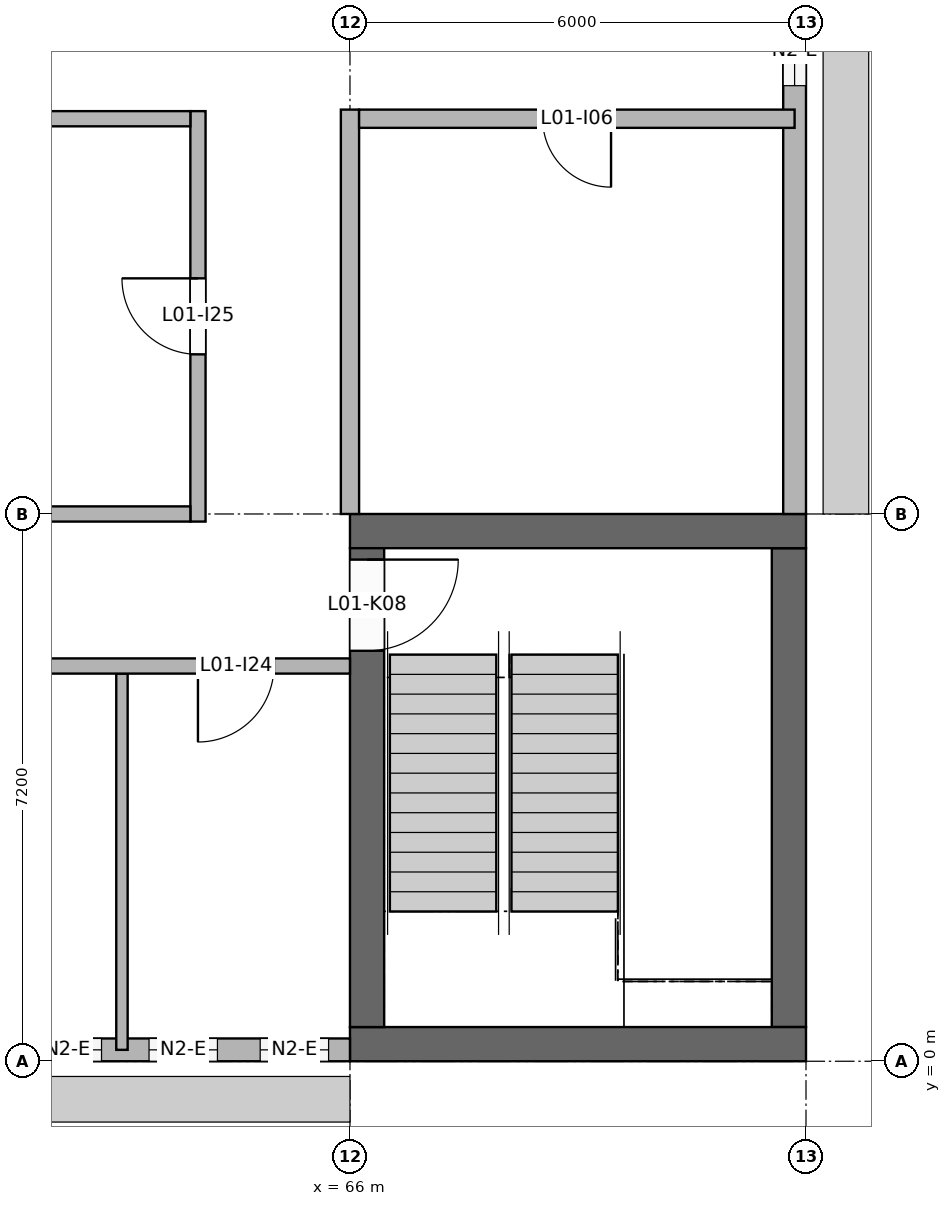
"""IFC4 building model, lengths in metres.
Left out: names, types, materials, properties, quantities, classifications, styles, units other than length and angle.
Written with IfcOpenShell. Run it as: python <this file> out.ifc"""

import sys

from ifc_helpers import new_model, si_unit, direction, frame, frame_2d, origin, place, context, subcontext, project, spatial, rectangle, extrude, element, fill, save


model = new_model("IFC4")
c1 = context("Model", 3, precision=1e-05, world=origin(), true_north=direction((0.0, 1.0)))
c2 = subcontext(c1, "Body", "Model", "MODEL_VIEW")
j1 = project(units=[si_unit("LENGTHUNIT", "METRE"), si_unit("PLANEANGLEUNIT", "RADIAN")], contexts=[c1])
p1 = place(None, origin())
s1 = spatial("IfcSite", under=j1, at=p1, CompositionType="ELEMENT")
p2 = place(p1, origin())
s2 = spatial("IfcBuilding", under=s1, at=p2, CompositionType="ELEMENT")
p3 = place(p2, frame((0.0, 0.0, 4.2)))
s3 = spatial("IfcBuildingStorey", under=s2, at=p3, CompositionType="ELEMENT", Elevation=4.2)
for number, where, z_axis, x_axis in (
    (1, (66.0, 0.225, 0.0), (0.0, 0.0, 1.0), (1.0, 0.0, 0.0)),
    (2, (66.0, 6.975, 0.0), (0.0, 0.0, 1.0), (1.0, 0.0, 0.0)),
):
    element("IfcWall", number, at=place(p3, frame(where, z_axis=z_axis, x_axis=x_axis)), inside=s3, PredefinedType="SHEAR", context=c2, shape_type="SweptSolid", body=[
        extrude(rectangle(XDim=6.0, YDim=0.45, at=frame_2d((3.0, 0.0))), origin(), (0.0, 0.0, 1.0), 3.95),
    ])
p4 = place(p3, frame((66.225, 0.45, 0.0), z_axis=(0.0, 0.0, 1.0), x_axis=(0.0, 1.0, 0.0)))
e3 = element("IfcWall", 3, at=p4, inside=s3, PredefinedType="SHEAR", context=c2, shape_type="SweptSolid", body=[
    extrude(rectangle(XDim=6.3, YDim=0.45, at=frame_2d((3.15, 0.0))), origin(), (0.0, 0.0, 1.0), 3.95),
])
p5 = place(p4, frame((4.95, 0.0, 0.0)))
e4 = element("IfcOpeningElement", 4, at=p5, cuts=e3, PredefinedType="OPENING", context=c2, shape_type="SweptSolid", body=[
    extrude(rectangle(XDim=1.2, YDim=2.1, at=frame_2d((0.6, 1.05))), frame((0.0, 0.235, 0.0), z_axis=(0.0, -1.0, 0.0), x_axis=(1.0, 0.0, 0.0)), (0.0, 0.0, 1.0), 0.47),
])
p6 = place(p3, frame((71.775, 0.45, 0.0), z_axis=(0.0, 0.0, 1.0), x_axis=(0.0, 1.0, 0.0)))
e5 = element("IfcWall", 5, at=p6, inside=s3, PredefinedType="SHEAR", context=c2, shape_type="SweptSolid", body=[
    extrude(rectangle(XDim=6.3, YDim=0.45, at=frame_2d((3.15, 0.0))), origin(), (0.0, 0.0, 1.0), 3.95),
])
p7 = place(p3, frame((60.35, 0.15, 0.0), z_axis=(0.0, 0.0, 1.0), x_axis=(1.0, 0.0, 0.0)))
e6 = element("IfcWall", 6, at=p7, inside=s3, PredefinedType="SOLIDWALL", context=c2, shape_type="SweptSolid", body=[
    extrude(rectangle(XDim=5.65, YDim=0.3, at=frame_2d((2.825, 0.0))), origin(), (0.0, 0.0, 1.0), 3.15),
])
p8 = place(p7, frame((0.194, 0.0, 0.9)))
e7 = element("IfcOpeningElement", 7, at=p8, cuts=e6, PredefinedType="OPENING", context=c2, shape_type="SweptSolid", body=[
    extrude(rectangle(XDim=0.9, YDim=1.2, at=frame_2d((0.45, 0.6))), frame((0.0, 0.16, 0.0), z_axis=(0.0, -1.0, 0.0), x_axis=(1.0, 0.0, 0.0)), (0.0, 0.0, 1.0), 0.32),
])
p9 = place(p7, frame((1.481, 0.0, 0.9)))
e8 = element("IfcOpeningElement", 8, at=p9, cuts=e6, PredefinedType="OPENING", context=c2, shape_type="SweptSolid", body=[
    extrude(rectangle(XDim=0.9, YDim=1.2, at=frame_2d((0.45, 0.6))), frame((0.0, 0.16, 0.0), z_axis=(0.0, -1.0, 0.0), x_axis=(1.0, 0.0, 0.0)), (0.0, 0.0, 1.0), 0.32),
])
p10 = place(p7, frame((3.006, 0.0, 0.9)))
e9 = element("IfcOpeningElement", 9, at=p10, cuts=e6, PredefinedType="OPENING", context=c2, shape_type="SweptSolid", body=[
    extrude(rectangle(XDim=0.9, YDim=1.2, at=frame_2d((0.45, 0.6))), frame((0.0, 0.16, 0.0), z_axis=(0.0, -1.0, 0.0), x_axis=(1.0, 0.0, 0.0)), (0.0, 0.0, 1.0), 0.32),
])
p11 = place(p7, frame((4.469, 0.0, 0.9)))
e10 = element("IfcOpeningElement", 10, at=p11, cuts=e6, PredefinedType="OPENING", context=c2, shape_type="SweptSolid", body=[
    extrude(rectangle(XDim=0.9, YDim=1.2, at=frame_2d((0.45, 0.6))), frame((0.0, 0.16, 0.0), z_axis=(0.0, -1.0, 0.0), x_axis=(1.0, 0.0, 0.0)), (0.0, 0.0, 1.0), 0.32),
])
p12 = place(p3, frame((71.85, 7.2, 0.0), z_axis=(0.0, 0.0, 1.0), x_axis=(0.0, 1.0, 0.0)))
e11 = element("IfcWall", 11, at=p12, inside=s3, PredefinedType="SOLIDWALL", context=c2, shape_type="SweptSolid", body=[
    extrude(rectangle(XDim=6.85, YDim=0.3, at=frame_2d((3.425, 0.0))), origin(), (0.0, 0.0, 1.0), 3.05),
])
p13 = place(p12, frame((5.635, 0.0, 0.9)))
e12 = element("IfcOpeningElement", 12, at=p13, cuts=e11, PredefinedType="OPENING", context=c2, shape_type="SweptSolid", body=[
    extrude(rectangle(XDim=0.9, YDim=1.2, at=frame_2d((0.45, 0.6))), frame((0.0, 0.16, 0.0), z_axis=(0.0, -1.0, 0.0), x_axis=(1.0, 0.0, 0.0)), (0.0, 0.0, 1.0), 0.32),
])
p14 = place(p3, frame((63.0, 0.15, 0.0), z_axis=(0.0, 0.0, 1.0), x_axis=(0.0, 1.0, 0.0)))
e13 = element("IfcWall", 13, at=p14, inside=s3, PredefinedType="PARTITIONING", context=c2, shape_type="SweptSolid", body=[
    extrude(rectangle(XDim=4.95, YDim=0.15, at=frame_2d((2.475, 0.0))), origin(), (0.0, 0.0, 1.0), 3.15),
])
p15 = place(p3, frame((64.0, 7.1, 0.0), z_axis=(0.0, 0.0, 1.0), x_axis=(0.0, 1.0, 0.0)))
e14 = element("IfcWall", 14, at=p15, inside=s3, PredefinedType="PARTITIONING", context=c2, shape_type="SweptSolid", body=[
    extrude(rectangle(XDim=5.4, YDim=0.2, at=frame_2d((2.7, 0.0))), origin(), (0.0, 0.0, 1.0), 3.15),
])
p16 = place(p15, frame((2.2, 0.0, 0.0)))
e15 = element("IfcOpeningElement", 15, at=p16, cuts=e14, PredefinedType="OPENING", context=c2, shape_type="SweptSolid", body=[
    extrude(rectangle(XDim=1.0, YDim=2.1, at=frame_2d((0.5, 1.05))), frame((0.0, 0.11, 0.0), z_axis=(0.0, -1.0, 0.0), x_axis=(1.0, 0.0, 0.0)), (0.0, 0.0, 1.0), 0.22),
])
p17 = place(p3, frame((66.0, 7.2, 0.0), z_axis=(0.0, 0.0, 1.0), x_axis=(0.0, 1.0, 0.0)))
e16 = element("IfcWall", 16, at=p17, inside=s3, PredefinedType="PARTITIONING", context=c2, shape_type="SweptSolid", body=[
    extrude(rectangle(XDim=5.32, YDim=0.24, at=frame_2d((2.66, 0.0))), origin(), (0.0, 0.0, 1.0), 3.05),
])
p18 = place(p3, frame((54.15, 5.2, 0.0), z_axis=(0.0, 0.0, 1.0), x_axis=(1.0, 0.0, 0.0)))
e17 = element("IfcWall", 17, at=p18, inside=s3, PredefinedType="PARTITIONING", context=c2, shape_type="SweptSolid", body=[
    extrude(rectangle(XDim=11.85, YDim=0.2, at=frame_2d((5.925, 0.0))), origin(), (0.0, 0.0, 1.0), 3.05),
])
p19 = place(p18, frame((0.925, 0.0, 0.0)))
e18 = element("IfcOpeningElement", 18, at=p19, cuts=e17, PredefinedType="OPENING", context=c2, shape_type="SweptSolid", body=[
    extrude(rectangle(XDim=1.0, YDim=2.1, at=frame_2d((0.5, 1.05))), frame((0.0, 0.11, 0.0), z_axis=(0.0, -1.0, 0.0), x_axis=(1.0, 0.0, 0.0)), (0.0, 0.0, 1.0), 0.22),
])
p20 = place(p18, frame((3.85, 0.0, 0.0)))
e19 = element("IfcOpeningElement", 19, at=p20, cuts=e17, PredefinedType="OPENING", context=c2, shape_type="SweptSolid", body=[
    extrude(rectangle(XDim=1.0, YDim=2.1, at=frame_2d((0.5, 1.05))), frame((0.0, 0.11, 0.0), z_axis=(0.0, -1.0, 0.0), x_axis=(1.0, 0.0, 0.0)), (0.0, 0.0, 1.0), 0.22),
])
p21 = place(p18, frame((6.85, 0.0, 0.0)))
e20 = element("IfcOpeningElement", 20, at=p21, cuts=e17, PredefinedType="OPENING", context=c2, shape_type="SweptSolid", body=[
    extrude(rectangle(XDim=1.0, YDim=2.1, at=frame_2d((0.5, 1.05))), frame((0.0, 0.11, 0.0), z_axis=(0.0, -1.0, 0.0), x_axis=(1.0, 0.0, 0.0)), (0.0, 0.0, 1.0), 0.22),
])
p22 = place(p18, frame((9.85, 0.0, 0.0)))
e21 = element("IfcOpeningElement", 21, at=p22, cuts=e17, PredefinedType="OPENING", context=c2, shape_type="SweptSolid", body=[
    extrude(rectangle(XDim=1.0, YDim=2.1, at=frame_2d((0.5, 1.05))), frame((0.0, 0.11, 0.0), z_axis=(0.0, -1.0, 0.0), x_axis=(1.0, 0.0, 0.0)), (0.0, 0.0, 1.0), 0.22),
])
p23 = place(p3, frame((60.35, 7.2, 0.0), z_axis=(0.0, 0.0, 1.0), x_axis=(1.0, 0.0, 0.0)))
e22 = element("IfcWall", 22, at=p23, inside=s3, PredefinedType="PARTITIONING", context=c2, shape_type="SweptSolid", body=[
    extrude(rectangle(XDim=3.55, YDim=0.2, at=frame_2d((1.775, 0.0))), origin(), (0.0, 0.0, 1.0), 3.15),
])
p24 = place(p3, frame((54.15, 12.4, 0.0), z_axis=(0.0, 0.0, 1.0), x_axis=(1.0, 0.0, 0.0)))
e23 = element("IfcWall", 23, at=p24, inside=s3, PredefinedType="PARTITIONING", context=c2, shape_type="SweptSolid", body=[
    extrude(rectangle(XDim=9.75, YDim=0.2, at=frame_2d((4.875, 0.0))), origin(), (0.0, 0.0, 1.0), 3.05),
])
p25 = place(p24, frame((5.6, 0.0, 0.0)))
e24 = element("IfcOpeningElement", 24, at=p25, cuts=e23, PredefinedType="OPENING", context=c2, shape_type="SweptSolid", body=[
    extrude(rectangle(XDim=1.0, YDim=2.1, at=frame_2d((0.5, 1.05))), frame((0.0, 0.11, 0.0), z_axis=(0.0, -1.0, 0.0), x_axis=(1.0, 0.0, 0.0)), (0.0, 0.0, 1.0), 0.22),
])
p26 = place(p3, frame((66.12, 12.4, 0.0), z_axis=(0.0, 0.0, 1.0), x_axis=(1.0, 0.0, 0.0)))
e25 = element("IfcWall", 25, at=p26, inside=s3, PredefinedType="PARTITIONING", context=c2, shape_type="SweptSolid", body=[
    extrude(rectangle(XDim=5.73, YDim=0.24, at=frame_2d((2.865, 0.0))), origin(), (0.0, 0.0, 1.0), 3.05),
])
p27 = place(p26, frame((2.415, 0.0, 0.0)))
e26 = element("IfcOpeningElement", 26, at=p27, cuts=e25, PredefinedType="OPENING", context=c2, shape_type="SweptSolid", body=[
    extrude(rectangle(XDim=0.9, YDim=2.1, at=frame_2d((0.45, 1.05))), frame((0.0, 0.13, 0.0), z_axis=(0.0, -1.0, 0.0), x_axis=(1.0, 0.0, 0.0)), (0.0, 0.0, 1.0), 0.26),
])
p28 = place(p9, origin())
e27 = element("IfcWindow", 27, at=p28, inside=s3, PartitioningType="SINGLE_PANEL", PredefinedType="WINDOW", context=c2, shape_type="SweptSolid", body=[
    extrude(rectangle(XDim=0.9, YDim=1.2, at=frame_2d((0.45, 0.6))), frame((0.0, 0.03, 0.0), z_axis=(0.0, -1.0, 0.0), x_axis=(1.0, 0.0, 0.0)), (0.0, 0.0, 1.0), 0.06),
])
fill(e8, e27)
p29 = place(p10, origin())
e28 = element("IfcWindow", 28, at=p29, inside=s3, PartitioningType="SINGLE_PANEL", PredefinedType="WINDOW", context=c2, shape_type="SweptSolid", body=[
    extrude(rectangle(XDim=0.9, YDim=1.2, at=frame_2d((0.45, 0.6))), frame((0.0, 0.03, 0.0), z_axis=(0.0, -1.0, 0.0), x_axis=(1.0, 0.0, 0.0)), (0.0, 0.0, 1.0), 0.06),
])
fill(e9, e28)
p30 = place(p11, origin())
e29 = element("IfcWindow", 29, at=p30, inside=s3, PartitioningType="SINGLE_PANEL", PredefinedType="WINDOW", context=c2, shape_type="SweptSolid", body=[
    extrude(rectangle(XDim=0.9, YDim=1.2, at=frame_2d((0.45, 0.6))), frame((0.0, 0.03, 0.0), z_axis=(0.0, -1.0, 0.0), x_axis=(1.0, 0.0, 0.0)), (0.0, 0.0, 1.0), 0.06),
])
fill(e10, e29)
p31 = place(p13, origin())
e30 = element("IfcWindow", 30, at=p31, inside=s3, PartitioningType="SINGLE_PANEL", PredefinedType="WINDOW", context=c2, shape_type="SweptSolid", body=[
    extrude(rectangle(XDim=0.9, YDim=1.2, at=frame_2d((0.45, 0.6))), frame((0.0, 0.03, 0.0), z_axis=(0.0, -1.0, 0.0), x_axis=(1.0, 0.0, 0.0)), (0.0, 0.0, 1.0), 0.06),
])
fill(e12, e30)
p32 = place(p5, frame((1.2, 0.0, 0.0), z_axis=(0.0, 0.0, 1.0), x_axis=(-1.0, 0.0, 0.0)))
e31 = element("IfcDoor", 31, at=p32, inside=s3, OperationType="SINGLE_SWING_LEFT", PredefinedType="DOOR", context=c2, shape_type="SweptSolid", body=[
    extrude(rectangle(XDim=1.2, YDim=2.1, at=frame_2d((0.6, 1.05))), frame((0.0, 0.025, 0.0), z_axis=(0.0, -1.0, 0.0), x_axis=(1.0, 0.0, 0.0)), (0.0, 0.0, 1.0), 0.05),
])
fill(e4, e31)
p33 = place(p27, frame((0.9, 0.0, 0.0), z_axis=(0.0, 0.0, 1.0), x_axis=(-1.0, 0.0, 0.0)))
e32 = element("IfcDoor", 32, at=p33, inside=s3, OperationType="SINGLE_SWING_LEFT", PredefinedType="DOOR", context=c2, shape_type="SweptSolid", body=[
    extrude(rectangle(XDim=0.9, YDim=2.1, at=frame_2d((0.45, 1.05))), frame((0.0, 0.025, 0.0), z_axis=(0.0, -1.0, 0.0), x_axis=(1.0, 0.0, 0.0)), (0.0, 0.0, 1.0), 0.05),
])
fill(e26, e32)
p34 = place(p22, frame((1.0, 0.0, 0.0), z_axis=(0.0, 0.0, 1.0), x_axis=(-1.0, 0.0, 0.0)))
e33 = element("IfcDoor", 33, at=p34, inside=s3, OperationType="SINGLE_SWING_RIGHT", PredefinedType="DOOR", context=c2, shape_type="SweptSolid", body=[
    extrude(rectangle(XDim=1.0, YDim=2.1, at=frame_2d((0.5, 1.05))), frame((0.0, 0.025, 0.0), z_axis=(0.0, -1.0, 0.0), x_axis=(1.0, 0.0, 0.0)), (0.0, 0.0, 1.0), 0.05),
])
fill(e21, e33)
p35 = place(p16, origin())
e34 = element("IfcDoor", 34, at=p35, inside=s3, OperationType="SINGLE_SWING_RIGHT", PredefinedType="DOOR", context=c2, shape_type="SweptSolid", body=[
    extrude(rectangle(XDim=1.0, YDim=2.1, at=frame_2d((0.5, 1.05))), frame((0.0, 0.025, 0.0), z_axis=(0.0, -1.0, 0.0), x_axis=(1.0, 0.0, 0.0)), (0.0, 0.0, 1.0), 0.05),
])
fill(e15, e34)
save(model, sys.argv[1])
